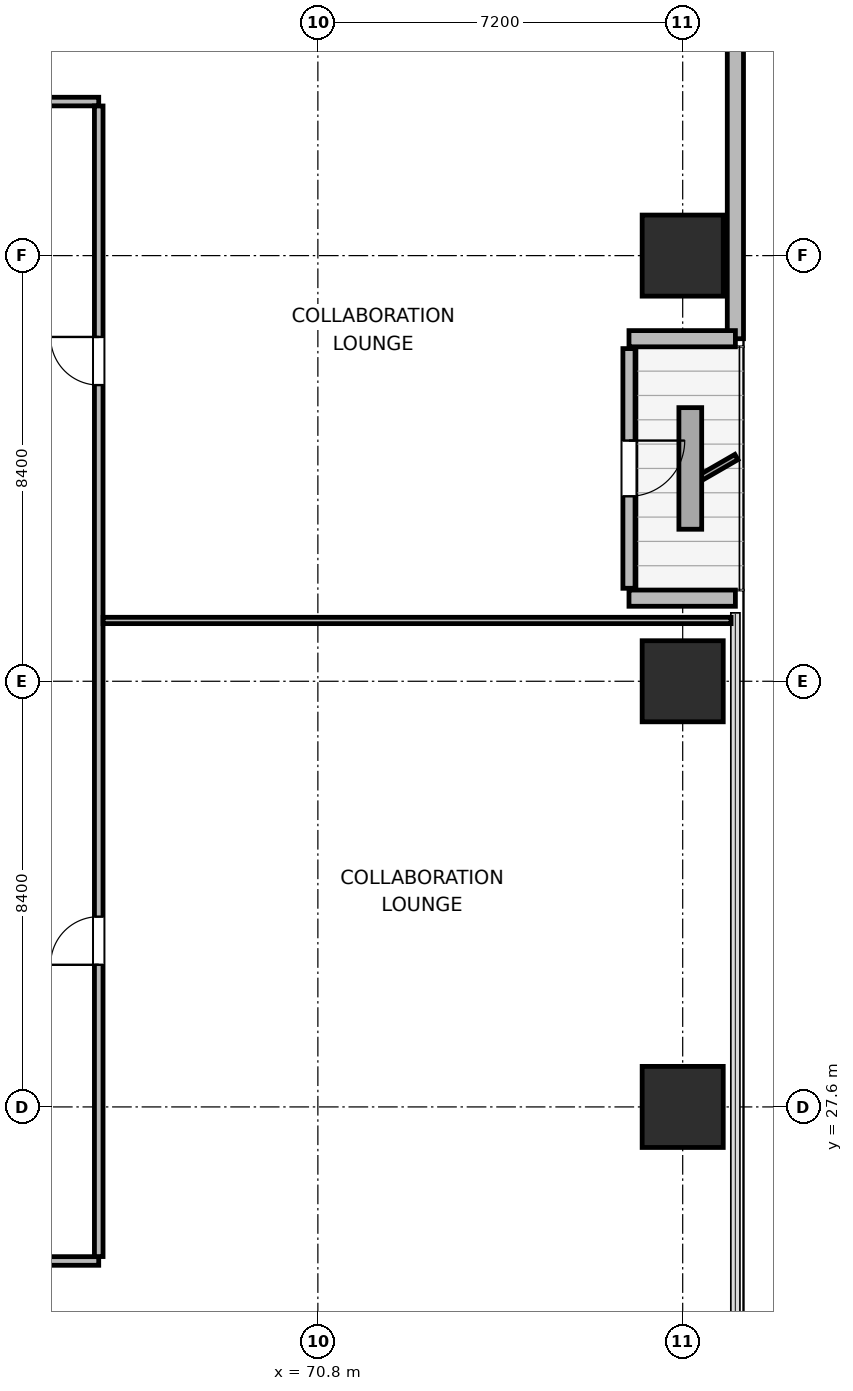
"""IFC4 building model, lengths in metres.
Left out: names, types, materials, properties, quantities, classifications, styles, units other than length and angle.
Written with IfcOpenShell. Run it as: python <this file> out.ifc"""

import sys

from ifc_helpers import new_model, si_unit, direction, frame, frame_2d, origin, origin_2d, place, context, subcontext, project, spatial, rectangle, extrude, element, fill, save


model = new_model("IFC4")
c1 = context("Model", 3, precision=1e-05, world=origin(), true_north=direction((0.0, 1.0)))
c2 = subcontext(c1, "Body", "Model", "MODEL_VIEW")
j1 = project(units=[si_unit("LENGTHUNIT", "METRE"), si_unit("PLANEANGLEUNIT", "RADIAN")], contexts=[c1])
p1 = place(None, origin())
s1 = spatial("IfcSite", under=j1, at=p1, CompositionType="ELEMENT")
p2 = place(p1, origin())
s2 = spatial("IfcBuilding", under=s1, at=p2, CompositionType="ELEMENT")
p3 = place(p2, frame((0.0, 0.0, 60.6)))
s3 = spatial("IfcBuildingStorey", under=s2, at=p3, CompositionType="ELEMENT", Elevation=60.6)
for number, where, z_axis, x_axis in (
    (1, (78.0, 27.6, 0.0), (0.0, 0.0, 1.0), (1.0, 0.0, 0.0)),
    (2, (78.0, 36.0, 0.0), (0.0, 0.0, 1.0), (1.0, 0.0, 0.0)),
    (3, (78.0, 44.4, 0.0), (0.0, 0.0, 1.0), (1.0, 0.0, 0.0)),
):
    element("IfcColumn", number, at=place(p3, frame(where, z_axis=z_axis, x_axis=x_axis)), inside=s3, PredefinedType="COLUMN", context=c2, shape_type="SweptSolid", body=[
        extrude(rectangle(XDim=1.6, YDim=1.6, at=origin_2d()), origin(), (0.0, 0.0, 1.0), 3.9),
    ])
p4 = place(p3, frame((79.04, 56.979, 0.0), z_axis=(0.0, 0.0, 1.0), x_axis=(0.0, -1.0, 0.0)))
e4 = element("IfcWall", 4, at=p4, inside=s3, PredefinedType="SOLIDWALL", context=c2, shape_type="SweptSolid", body=[
    extrude(rectangle(XDim=14.219, YDim=0.32, at=frame_2d((7.109, 0.0))), origin(), (0.0, 0.0, 1.0), 3.64),
])
p5 = place(p3, frame((79.04, 42.76, 0.0), z_axis=(0.0, 0.0, 1.0), x_axis=(-1.0, 0.0, 0.0)))
e5 = element("IfcWall", 5, at=p5, inside=s3, PredefinedType="SOLIDWALL", context=c2, shape_type="SweptSolid", body=[
    extrude(rectangle(XDim=2.1, YDim=0.32, at=frame_2d((1.05, 0.0))), origin(), (0.0, 0.0, 1.0), 2.875),
])
p6 = place(p3, frame((76.94, 42.565, 0.0), z_axis=(0.0, 0.0, 1.0), x_axis=(0.0, -1.0, 0.0)))
e6 = element("IfcWall", 6, at=p6, inside=s3, PredefinedType="SOLIDWALL", context=c2, shape_type="SweptSolid", body=[
    extrude(rectangle(XDim=4.73, YDim=0.24, at=frame_2d((2.365, 0.0))), origin(), (0.0, 0.0, 1.0), 3.162),
])
p7 = place(p6, frame((1.815, 0.0, 0.0)))
e7 = element("IfcOpeningElement", 7, at=p7, cuts=e6, PredefinedType="OPENING", context=c2, shape_type="SweptSolid", body=[
    extrude(rectangle(XDim=1.1, YDim=2.04, at=frame_2d((0.55, 1.02))), frame((0.0, 0.13, 0.0), z_axis=(0.0, -1.0, 0.0), x_axis=(1.0, 0.0, 0.0)), (0.0, 0.0, 1.0), 0.26),
])
p8 = place(p3, frame((76.94, 37.64, 0.0), z_axis=(0.0, 0.0, 1.0), x_axis=(1.0, 0.0, 0.0)))
e8 = element("IfcWall", 8, at=p8, inside=s3, PredefinedType="SOLIDWALL", context=c2, shape_type="SweptSolid", body=[
    extrude(rectangle(XDim=2.1, YDim=0.32, at=frame_2d((1.05, 0.0))), origin(), (0.0, 0.0, 1.0), 2.875),
])
p9 = place(p3, frame((29.525, 24.56, 0.0), z_axis=(0.0, 0.0, 1.0), x_axis=(1.0, 0.0, 0.0)))
e9 = element("IfcWall", 9, at=p9, inside=s3, PredefinedType="PARTITIONING", context=c2, shape_type="SweptSolid", body=[
    extrude(rectangle(XDim=36.95, YDim=0.17, at=frame_2d((18.475, 0.0))), origin(), (0.0, 0.0, 1.0), 3.64),
])
p10 = place(p9, frame((2.283, 0.0, 0.0)))
e10 = element("IfcOpeningElement", 10, at=p10, cuts=e9, PredefinedType="OPENING", context=c2, shape_type="SweptSolid", body=[
    extrude(rectangle(XDim=0.95, YDim=2.04, at=frame_2d((0.475, 1.02))), frame((0.0, 0.095, 0.0), z_axis=(0.0, -1.0, 0.0), x_axis=(1.0, 0.0, 0.0)), (0.0, 0.0, 1.0), 0.19),
])
p11 = place(p9, frame((7.2, 0.0, 0.0)))
e11 = element("IfcOpeningElement", 11, at=p11, cuts=e9, PredefinedType="OPENING", context=c2, shape_type="SweptSolid", body=[
    extrude(rectangle(XDim=0.95, YDim=2.04, at=frame_2d((0.475, 1.02))), frame((0.0, 0.095, 0.0), z_axis=(0.0, -1.0, 0.0), x_axis=(1.0, 0.0, 0.0)), (0.0, 0.0, 1.0), 0.19),
])
p12 = place(p9, frame((11.52, 0.0, 0.0)))
e12 = element("IfcOpeningElement", 12, at=p12, cuts=e9, PredefinedType="OPENING", context=c2, shape_type="SweptSolid", body=[
    extrude(rectangle(XDim=0.95, YDim=2.04, at=frame_2d((0.475, 1.02))), frame((0.0, 0.095, 0.0), z_axis=(0.0, -1.0, 0.0), x_axis=(1.0, 0.0, 0.0)), (0.0, 0.0, 1.0), 0.19),
])
p13 = place(p9, frame((15.84, 0.0, 0.0)))
e13 = element("IfcOpeningElement", 13, at=p13, cuts=e9, PredefinedType="OPENING", context=c2, shape_type="SweptSolid", body=[
    extrude(rectangle(XDim=0.95, YDim=2.04, at=frame_2d((0.475, 1.02))), frame((0.0, 0.095, 0.0), z_axis=(0.0, -1.0, 0.0), x_axis=(1.0, 0.0, 0.0)), (0.0, 0.0, 1.0), 0.19),
])
p14 = place(p9, frame((20.16, 0.0, 0.0)))
e14 = element("IfcOpeningElement", 14, at=p14, cuts=e9, PredefinedType="OPENING", context=c2, shape_type="SweptSolid", body=[
    extrude(rectangle(XDim=0.95, YDim=2.04, at=frame_2d((0.475, 1.02))), frame((0.0, 0.095, 0.0), z_axis=(0.0, -1.0, 0.0), x_axis=(1.0, 0.0, 0.0)), (0.0, 0.0, 1.0), 0.19),
])
p15 = place(p9, frame((24.48, 0.0, 0.0)))
e15 = element("IfcOpeningElement", 15, at=p15, cuts=e9, PredefinedType="OPENING", context=c2, shape_type="SweptSolid", body=[
    extrude(rectangle(XDim=0.95, YDim=2.04, at=frame_2d((0.475, 1.02))), frame((0.0, 0.095, 0.0), z_axis=(0.0, -1.0, 0.0), x_axis=(1.0, 0.0, 0.0)), (0.0, 0.0, 1.0), 0.19),
])
p16 = place(p9, frame((28.8, 0.0, 0.0)))
e16 = element("IfcOpeningElement", 16, at=p16, cuts=e9, PredefinedType="OPENING", context=c2, shape_type="SweptSolid", body=[
    extrude(rectangle(XDim=0.95, YDim=2.04, at=frame_2d((0.475, 1.02))), frame((0.0, 0.095, 0.0), z_axis=(0.0, -1.0, 0.0), x_axis=(1.0, 0.0, 0.0)), (0.0, 0.0, 1.0), 0.19),
])
p17 = place(p9, frame((33.718, 0.0, 0.0)))
e17 = element("IfcOpeningElement", 17, at=p17, cuts=e9, PredefinedType="OPENING", context=c2, shape_type="SweptSolid", body=[
    extrude(rectangle(XDim=0.95, YDim=2.04, at=frame_2d((0.475, 1.02))), frame((0.0, 0.095, 0.0), z_axis=(0.0, -1.0, 0.0), x_axis=(1.0, 0.0, 0.0)), (0.0, 0.0, 1.0), 0.19),
])
p18 = place(p3, frame((29.525, 47.44, 0.0), z_axis=(0.0, 0.0, 1.0), x_axis=(1.0, 0.0, 0.0)))
e18 = element("IfcWall", 18, at=p18, inside=s3, PredefinedType="PARTITIONING", context=c2, shape_type="SweptSolid", body=[
    extrude(rectangle(XDim=36.95, YDim=0.17, at=frame_2d((18.475, 0.0))), origin(), (0.0, 0.0, 1.0), 3.64),
])
p19 = place(p18, frame((4.133, 0.0, 0.0)))
e19 = element("IfcOpeningElement", 19, at=p19, cuts=e18, PredefinedType="OPENING", context=c2, shape_type="SweptSolid", body=[
    extrude(rectangle(XDim=0.95, YDim=2.04, at=frame_2d((0.475, 1.02))), frame((0.0, 0.095, 0.0), z_axis=(0.0, -1.0, 0.0), x_axis=(1.0, 0.0, 0.0)), (0.0, 0.0, 1.0), 0.19),
])
p20 = place(p18, frame((13.645, 0.0, 0.0)))
e20 = element("IfcOpeningElement", 20, at=p20, cuts=e18, PredefinedType="OPENING", context=c2, shape_type="SweptSolid", body=[
    extrude(rectangle(XDim=0.95, YDim=2.04, at=frame_2d((0.475, 1.02))), frame((0.0, 0.095, 0.0), z_axis=(0.0, -1.0, 0.0), x_axis=(1.0, 0.0, 0.0)), (0.0, 0.0, 1.0), 0.19),
])
p21 = place(p18, frame((20.555, 0.0, 0.0)))
e21 = element("IfcOpeningElement", 21, at=p21, cuts=e18, PredefinedType="OPENING", context=c2, shape_type="SweptSolid", body=[
    extrude(rectangle(XDim=0.95, YDim=2.04, at=frame_2d((0.475, 1.02))), frame((0.0, 0.095, 0.0), z_axis=(0.0, -1.0, 0.0), x_axis=(1.0, 0.0, 0.0)), (0.0, 0.0, 1.0), 0.19),
])
p22 = place(p18, frame((29.517, 0.0, 0.0)))
e22 = element("IfcOpeningElement", 22, at=p22, cuts=e18, PredefinedType="OPENING", context=c2, shape_type="SweptSolid", body=[
    extrude(rectangle(XDim=0.95, YDim=2.04, at=frame_2d((0.475, 1.02))), frame((0.0, 0.095, 0.0), z_axis=(0.0, -1.0, 0.0), x_axis=(1.0, 0.0, 0.0)), (0.0, 0.0, 1.0), 0.19),
])
p23 = place(p3, frame((66.475, 24.647, 0.0), z_axis=(0.0, 0.0, 1.0), x_axis=(0.0, 1.0, 0.0)))
e23 = element("IfcWall", 23, at=p23, inside=s3, PredefinedType="PARTITIONING", context=c2, shape_type="SweptSolid", body=[
    extrude(rectangle(XDim=22.706, YDim=0.17, at=frame_2d((11.353, 0.0))), origin(), (0.0, 0.0, 1.0), 3.64),
])
p24 = place(p23, frame((5.758, 0.0, 0.0)))
e24 = element("IfcOpeningElement", 24, at=p24, cuts=e23, PredefinedType="OPENING", context=c2, shape_type="SweptSolid", body=[
    extrude(rectangle(XDim=0.95, YDim=2.04, at=frame_2d((0.475, 1.02))), frame((0.0, 0.095, 0.0), z_axis=(0.0, -1.0, 0.0), x_axis=(1.0, 0.0, 0.0)), (0.0, 0.0, 1.0), 0.19),
])
p25 = place(p23, frame((17.198, 0.0, 0.0)))
e25 = element("IfcOpeningElement", 25, at=p25, cuts=e23, PredefinedType="OPENING", context=c2, shape_type="SweptSolid", body=[
    extrude(rectangle(XDim=0.95, YDim=2.04, at=frame_2d((0.475, 1.02))), frame((0.0, 0.095, 0.0), z_axis=(0.0, -1.0, 0.0), x_axis=(1.0, 0.0, 0.0)), (0.0, 0.0, 1.0), 0.19),
])
p26 = place(p3, frame((66.562, 37.2, 0.0), z_axis=(0.0, 0.0, 1.0), x_axis=(1.0, 0.0, 0.0)))
e26 = element("IfcWall", 26, at=p26, inside=s3, PredefinedType="PARTITIONING", context=c2, shape_type="SweptSolid", body=[
    extrude(rectangle(XDim=12.393, YDim=0.125, at=frame_2d((6.197, 0.0))), origin(), (0.0, 0.0, 1.0), 3.64),
])
p27 = place(p7, origin())
e27 = element("IfcDoor", 27, at=p27, inside=s3, OperationType="SINGLE_SWING_LEFT", PredefinedType="DOOR", context=c2, shape_type="SweptSolid", body=[
    extrude(rectangle(XDim=1.1, YDim=2.04, at=frame_2d((0.55, 1.02))), frame((0.0, 0.025, 0.0), z_axis=(0.0, -1.0, 0.0), x_axis=(1.0, 0.0, 0.0)), (0.0, 0.0, 1.0), 0.05),
])
fill(e7, e27)
p28 = place(p24, origin())
e28 = element("IfcDoor", 28, at=p28, inside=s3, OperationType="SINGLE_SWING_LEFT", PredefinedType="DOOR", context=c2, shape_type="SweptSolid", body=[
    extrude(rectangle(XDim=0.95, YDim=2.04, at=frame_2d((0.475, 1.02))), frame((0.0, 0.025, 0.0), z_axis=(0.0, -1.0, 0.0), x_axis=(1.0, 0.0, 0.0)), (0.0, 0.0, 1.0), 0.05),
])
fill(e24, e28)
p29 = place(p25, origin())
e29 = element("IfcDoor", 29, at=p29, inside=s3, OperationType="SINGLE_SWING_RIGHT", PredefinedType="DOOR", context=c2, shape_type="SweptSolid", body=[
    extrude(rectangle(XDim=0.95, YDim=2.04, at=frame_2d((0.475, 1.02))), frame((0.0, 0.025, 0.0), z_axis=(0.0, -1.0, 0.0), x_axis=(1.0, 0.0, 0.0)), (0.0, 0.0, 1.0), 0.05),
])
fill(e25, e29)
save(model, sys.argv[1])
